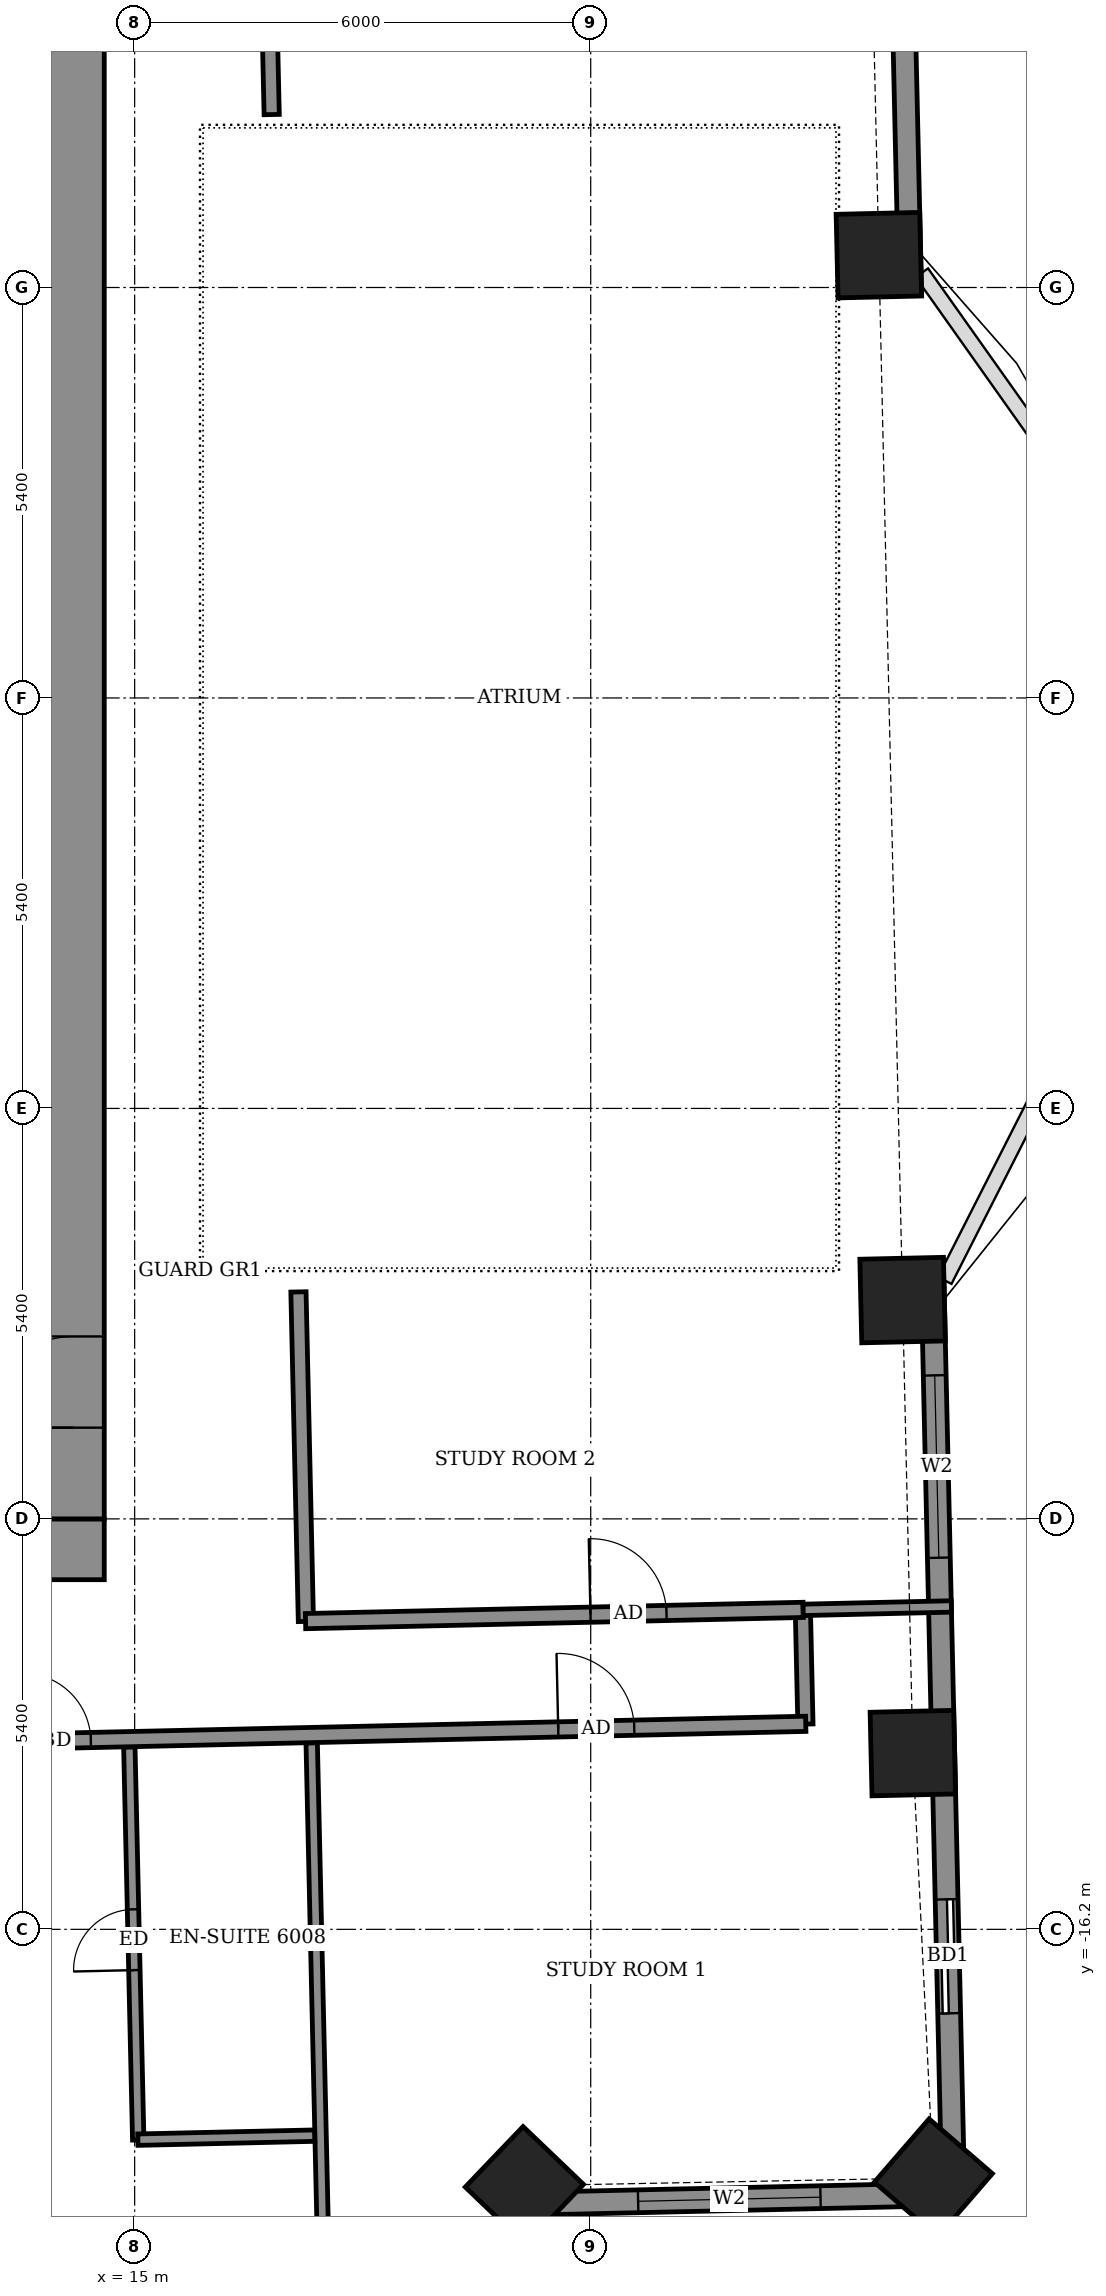
"""IFC4 building model, lengths in metres.
Left out: names, types, materials, properties, quantities, classifications, styles, units other than length and angle.
Written with IfcOpenShell. Run it as: python <this file> out.ifc"""

import sys

from ifc_helpers import new_model, si_unit, direction, frame, frame_2d, origin, origin_2d, place, context, subcontext, project, spatial, rectangle, extrude, element, fill, save


model = new_model("IFC4")
c1 = context("Model", 3, precision=1e-05, world=origin(), true_north=direction((0.0, 1.0)))
c2 = subcontext(c1, "Body", "Model", "MODEL_VIEW")
j1 = project(units=[si_unit("LENGTHUNIT", "METRE"), si_unit("PLANEANGLEUNIT", "RADIAN")], contexts=[c1])
p1 = place(None, origin())
s1 = spatial("IfcSite", under=j1, at=p1, CompositionType="ELEMENT")
p2 = place(p1, origin())
s2 = spatial("IfcBuilding", under=s1, at=p2, CompositionType="ELEMENT")
p3 = place(p2, frame((0.0, 0.0, 238.3)))
s3 = spatial("IfcBuildingStorey", under=s2, at=p3, CompositionType="ELEMENT", Elevation=238.3)
for number, where, z_axis, x_axis in (
    (1, (20.127, -19.573, -0.55), (0.0, 0.0, 1.0), (0.691, 0.723, 0.0)),
    (2, (25.508, -19.47, -0.55), (0.0, 0.0, 1.0), (0.654, 0.756, 0.0)),
    (3, (25.238, -13.882, -0.55), (0.0, 0.0, 1.0), (-0.023, 1.0, 0.0)),
    (4, (25.103, -7.921, -0.55), (0.0, 0.0, 1.0), (-0.023, 1.0, 0.0)),
    (5, (24.791, 5.825, -0.55), (0.0, 0.0, 1.0), (-0.023, 1.0, 0.0)),
):
    element("IfcColumn", number, at=place(p3, frame(where, z_axis=z_axis, x_axis=x_axis)), inside=s3, PredefinedType="COLUMN", context=c2, shape_type="SweptSolid", body=[
        extrude(rectangle(XDim=1.1, YDim=1.1, at=origin_2d()), origin(), (0.0, 0.0, 1.0), 3.6),
    ])
p4 = place(p3, frame((25.77, -19.684, 0.0), z_axis=(0.0, 0.0, 1.0), x_axis=(-0.022688489476, 0.999742583091, 0.0)))
e6 = element("IfcWall", 6, at=p4, inside=s3, PredefinedType="SOLIDWALL", context=c2, shape_type="SweptSolid", body=[
    extrude(rectangle(XDim=12.299, YDim=0.3, at=frame_2d((6.15, 0.0))), origin(), (0.0, 0.0, 1.0), 2.55),
])
p5 = place(p4, frame((2.38, 0.0, 0.0)))
e7 = element("IfcOpeningElement", 7, at=p5, cuts=e6, PredefinedType="OPENING", context=c2, shape_type="SweptSolid", body=[
    extrude(rectangle(XDim=1.5, YDim=2.4, at=frame_2d((0.75, 1.2))), frame((0.0, 0.16, 0.0), z_axis=(0.0, -1.0, 0.0), x_axis=(1.0, 0.0, 0.0)), (0.0, 0.0, 1.0), 0.32),
])
p6 = place(p4, frame((8.375, 0.0, 0.9)))
e8 = element("IfcOpeningElement", 8, at=p6, cuts=e6, PredefinedType="OPENING", context=c2, shape_type="SweptSolid", body=[
    extrude(rectangle(XDim=2.4, YDim=1.5, at=frame_2d((1.2, 0.75))), frame((0.0, 0.16, 0.0), z_axis=(0.0, -1.0, 0.0), x_axis=(1.0, 0.0, 0.0)), (0.0, 0.0, 1.0), 0.32),
])
p7 = place(p3, frame((25.203, 5.31, 0.0), z_axis=(0.0, 0.0, 1.0), x_axis=(-0.022708061432, 0.999742138727, 0.0)))
e9 = element("IfcWall", 9, at=p7, inside=s3, PredefinedType="SOLIDWALL", context=c2, shape_type="SweptSolid", body=[
    extrude(rectangle(XDim=13.299, YDim=0.3, at=frame_2d((6.65, 0.0))), origin(), (0.0, 0.0, 1.0), 2.55),
])
p8 = place(p7, frame((3.974, 0.0, 0.0)))
e10 = element("IfcOpeningElement", 10, at=p8, cuts=e9, PredefinedType="OPENING", context=c2, shape_type="SweptSolid", body=[
    extrude(rectangle(XDim=1.5, YDim=2.4, at=frame_2d((0.75, 1.2))), frame((0.0, 0.16, 0.0), z_axis=(0.0, -1.0, 0.0), x_axis=(1.0, 0.0, 0.0)), (0.0, 0.0, 1.0), 0.32),
])
p9 = place(p7, frame((8.1, 0.0, 0.9)))
e11 = element("IfcOpeningElement", 11, at=p9, cuts=e9, PredefinedType="OPENING", context=c2, shape_type="SweptSolid", body=[
    extrude(rectangle(XDim=0.9, YDim=1.5, at=frame_2d((0.45, 0.75))), frame((0.0, 0.16, 0.0), z_axis=(0.0, -1.0, 0.0), x_axis=(1.0, 0.0, 0.0)), (0.0, 0.0, 1.0), 0.32),
])
p10 = place(p7, frame((9.738, 0.0, 0.9)))
e12 = element("IfcOpeningElement", 12, at=p10, cuts=e9, PredefinedType="OPENING", context=c2, shape_type="SweptSolid", body=[
    extrude(rectangle(XDim=2.4, YDim=1.5, at=frame_2d((1.2, 0.75))), frame((0.0, 0.16, 0.0), z_axis=(0.0, -1.0, 0.0), x_axis=(1.0, 0.0, 0.0)), (0.0, 0.0, 1.0), 0.32),
])
p11 = place(p3, frame((20.494, -25.205, 0.0), z_axis=(0.0, 0.0, 1.0), x_axis=(-0.022558128916, 0.999745533033, 0.0)))
e13 = element("IfcWall", 13, at=p11, inside=s3, PredefinedType="SOLIDWALL", context=c2, shape_type="SweptSolid", body=[
    extrude(rectangle(XDim=5.401, YDim=0.3, at=frame_2d((2.7, 0.0))), origin(), (0.0, 0.0, 1.0), 2.55),
])
p12 = place(p11, frame((1.762, 0.0, 0.9)))
e14 = element("IfcOpeningElement", 14, at=p12, cuts=e13, PredefinedType="OPENING", context=c2, shape_type="SweptSolid", body=[
    extrude(rectangle(XDim=2.4, YDim=1.5, at=frame_2d((1.2, 0.75))), frame((0.0, 0.16, 0.0), z_axis=(0.0, -1.0, 0.0), x_axis=(1.0, 0.0, 0.0)), (0.0, 0.0, 1.0), 0.32),
])
p13 = place(p3, frame((20.372, -19.806, 0.0), z_axis=(0.0, 0.0, 1.0), x_axis=(0.999745417973, 0.02256322766, 0.0)))
e15 = element("IfcWall", 15, at=p13, inside=s3, PredefinedType="SOLIDWALL", context=c2, shape_type="SweptSolid", body=[
    extrude(rectangle(XDim=5.399, YDim=0.3, at=frame_2d((2.7, 0.0))), origin(), (0.0, 0.0, 1.0), 2.55),
])
p14 = place(p13, frame((1.252, 0.0, 0.9)))
e16 = element("IfcOpeningElement", 16, at=p14, cuts=e15, PredefinedType="OPENING", context=c2, shape_type="SweptSolid", body=[
    extrude(rectangle(XDim=2.4, YDim=1.5, at=frame_2d((1.2, 0.75))), frame((0.0, 0.16, 0.0), z_axis=(0.0, -1.0, 0.0), x_axis=(1.0, 0.0, 0.0)), (0.0, 0.0, 1.0), 0.32),
])
p15 = place(p3, frame((17.587, -25.121, 0.0), z_axis=(0.0, 0.0, 1.0), x_axis=(-0.022662905301, 0.999743163379, 0.0)))
e17 = element("IfcWall", 17, at=p15, inside=s3, PredefinedType="PARTITIONING", context=c2, shape_type="SweptSolid", body=[
    extrude(rectangle(XDim=11.376, YDim=0.15, at=frame_2d((5.688, 0.0))), origin(), (0.0, 0.0, 1.0), 2.55),
])
p16 = place(p3, frame((15.047, -18.971, 0.0), z_axis=(0.0, 0.0, 1.0), x_axis=(-0.022665628603, 0.999743101642, 0.0)))
e18 = element("IfcWall", 18, at=p16, inside=s3, PredefinedType="PARTITIONING", context=c2, shape_type="SweptSolid", body=[
    extrude(rectangle(XDim=5.17, YDim=0.15, at=frame_2d((2.585, 0.0))), origin(), (0.0, 0.0, 1.0), 3.05),
])
p17 = place(p16, frame((2.235, 0.0, 0.0)))
e19 = element("IfcOpeningElement", 19, at=p17, cuts=e18, PredefinedType="OPENING", context=c2, shape_type="SweptSolid", body=[
    extrude(rectangle(XDim=0.8, YDim=2.1, at=frame_2d((0.4, 1.05))), frame((0.0, 0.085, 0.0), z_axis=(0.0, -1.0, 0.0), x_axis=(1.0, 0.0, 0.0)), (0.0, 0.0, 1.0), 0.17),
])
p18 = place(p3, frame((15.043, -18.967, 0.0), z_axis=(0.0, 0.0, 1.0), x_axis=(0.999740478815, 0.022781023197, 0.0)))
e20 = element("IfcWall", 20, at=p18, inside=s3, PredefinedType="PARTITIONING", context=c2, shape_type="SweptSolid", body=[
    extrude(rectangle(XDim=2.325, YDim=0.15, at=frame_2d((1.163, 0.0))), origin(), (0.0, 0.0, 1.0), 3.05),
])
p19 = place(p3, frame((23.825, -13.5, 0.0), z_axis=(0.0, 0.0, 1.0), x_axis=(-0.022632637625, 0.99974384905, 0.0)))
e21 = element("IfcWall", 21, at=p19, inside=s3, PredefinedType="PARTITIONING", context=c2, shape_type="SweptSolid", body=[
    extrude(rectangle(XDim=1.5, YDim=0.2, at=frame_2d((0.75, 0.0))), origin(), (0.0, 0.0, 1.0), 3.05),
])
p20 = place(p3, frame((-27.016, -14.65, 0.0), z_axis=(0.0, 0.0, 1.0), x_axis=(0.999742623033, 0.022686729391, 0.0)))
e22 = element("IfcWall", 22, at=p20, inside=s3, PredefinedType="PARTITIONING", context=c2, shape_type="SweptSolid", body=[
    extrude(rectangle(XDim=50.858, YDim=0.2, at=frame_2d((25.429, 0.0))), origin(), (0.0, 0.0, 1.0), 3.05),
])
p21 = place(p20, frame((1.625, 0.0, 0.0)))
e23 = element("IfcOpeningElement", 23, at=p21, cuts=e22, PredefinedType="OPENING", context=c2, shape_type="SweptSolid", body=[
    extrude(rectangle(XDim=1.0, YDim=2.1, at=frame_2d((0.5, 1.05))), frame((0.0, 0.11, 0.0), z_axis=(0.0, -1.0, 0.0), x_axis=(1.0, 0.0, 0.0)), (0.0, 0.0, 1.0), 0.22),
])
p22 = place(p20, frame((6.6, 0.0, 0.0)))
e24 = element("IfcOpeningElement", 24, at=p22, cuts=e22, PredefinedType="OPENING", context=c2, shape_type="SweptSolid", body=[
    extrude(rectangle(XDim=0.9, YDim=2.1, at=frame_2d((0.45, 1.05))), frame((0.0, 0.11, 0.0), z_axis=(0.0, -1.0, 0.0), x_axis=(1.0, 0.0, 0.0)), (0.0, 0.0, 1.0), 0.22),
])
p23 = place(p20, frame((11.5, 0.0, 0.0)))
e25 = element("IfcOpeningElement", 25, at=p23, cuts=e22, PredefinedType="OPENING", context=c2, shape_type="SweptSolid", body=[
    extrude(rectangle(XDim=0.9, YDim=2.1, at=frame_2d((0.45, 1.05))), frame((0.0, 0.11, 0.0), z_axis=(0.0, -1.0, 0.0), x_axis=(1.0, 0.0, 0.0)), (0.0, 0.0, 1.0), 0.22),
])
p24 = place(p20, frame((13.675, 0.0, 0.0)))
e26 = element("IfcOpeningElement", 26, at=p24, cuts=e22, PredefinedType="OPENING", context=c2, shape_type="SweptSolid", body=[
    extrude(rectangle(XDim=0.9, YDim=2.1, at=frame_2d((0.45, 1.05))), frame((0.0, 0.11, 0.0), z_axis=(0.0, -1.0, 0.0), x_axis=(1.0, 0.0, 0.0)), (0.0, 0.0, 1.0), 0.22),
])
p25 = place(p20, frame((20.625, 0.0, 0.0)))
e27 = element("IfcOpeningElement", 27, at=p25, cuts=e22, PredefinedType="OPENING", context=c2, shape_type="SweptSolid", body=[
    extrude(rectangle(XDim=0.9, YDim=2.1, at=frame_2d((0.45, 1.05))), frame((0.0, 0.11, 0.0), z_axis=(0.0, -1.0, 0.0), x_axis=(1.0, 0.0, 0.0)), (0.0, 0.0, 1.0), 0.22),
])
p26 = place(p20, frame((22.775, 0.0, 0.0)))
e28 = element("IfcOpeningElement", 28, at=p26, cuts=e22, PredefinedType="OPENING", context=c2, shape_type="SweptSolid", body=[
    extrude(rectangle(XDim=0.9, YDim=2.1, at=frame_2d((0.45, 1.05))), frame((0.0, 0.11, 0.0), z_axis=(0.0, -1.0, 0.0), x_axis=(1.0, 0.0, 0.0)), (0.0, 0.0, 1.0), 0.22),
])
p27 = place(p20, frame((29.65, 0.0, 0.0)))
e29 = element("IfcOpeningElement", 29, at=p27, cuts=e22, PredefinedType="OPENING", context=c2, shape_type="SweptSolid", body=[
    extrude(rectangle(XDim=0.9, YDim=2.1, at=frame_2d((0.45, 1.05))), frame((0.0, 0.11, 0.0), z_axis=(0.0, -1.0, 0.0), x_axis=(1.0, 0.0, 0.0)), (0.0, 0.0, 1.0), 0.22),
])
p28 = place(p20, frame((31.625, 0.0, 0.0)))
e30 = element("IfcOpeningElement", 30, at=p28, cuts=e22, PredefinedType="OPENING", context=c2, shape_type="SweptSolid", body=[
    extrude(rectangle(XDim=0.9, YDim=2.1, at=frame_2d((0.45, 1.05))), frame((0.0, 0.11, 0.0), z_axis=(0.0, -1.0, 0.0), x_axis=(1.0, 0.0, 0.0)), (0.0, 0.0, 1.0), 0.22),
])
p29 = place(p20, frame((38.5, 0.0, 0.0)))
e31 = element("IfcOpeningElement", 31, at=p29, cuts=e22, PredefinedType="OPENING", context=c2, shape_type="SweptSolid", body=[
    extrude(rectangle(XDim=0.9, YDim=2.1, at=frame_2d((0.45, 1.05))), frame((0.0, 0.11, 0.0), z_axis=(0.0, -1.0, 0.0), x_axis=(1.0, 0.0, 0.0)), (0.0, 0.0, 1.0), 0.22),
])
p30 = place(p20, frame((40.55, 0.0, 0.0)))
e32 = element("IfcOpeningElement", 32, at=p30, cuts=e22, PredefinedType="OPENING", context=c2, shape_type="SweptSolid", body=[
    extrude(rectangle(XDim=0.9, YDim=2.1, at=frame_2d((0.45, 1.05))), frame((0.0, 0.11, 0.0), z_axis=(0.0, -1.0, 0.0), x_axis=(1.0, 0.0, 0.0)), (0.0, 0.0, 1.0), 0.22),
])
p31 = place(p20, frame((47.601, 0.0, 0.0)))
e33 = element("IfcOpeningElement", 33, at=p31, cuts=e22, PredefinedType="OPENING", context=c2, shape_type="SweptSolid", body=[
    extrude(rectangle(XDim=1.0, YDim=2.1, at=frame_2d((0.5, 1.05))), frame((0.0, 0.11, 0.0), z_axis=(0.0, -1.0, 0.0), x_axis=(1.0, 0.0, 0.0)), (0.0, 0.0, 1.0), 0.22),
])
p32 = place(p3, frame((17.253, -12.149, 0.0), z_axis=(0.0, 0.0, 1.0), x_axis=(-0.022578158225, 0.999745080894, 0.0)))
e34 = element("IfcWall", 34, at=p32, inside=s3, PredefinedType="PARTITIONING", context=c2, shape_type="SweptSolid", body=[
    extrude(rectangle(XDim=4.336, YDim=0.2, at=frame_2d((2.168, 0.0))), origin(), (0.0, 0.0, 1.0), 3.05),
])
p33 = place(p3, frame((17.248, -12.145, 0.0), z_axis=(0.0, 0.0, 1.0), x_axis=(0.999744752818, 0.022592680497, 0.0)))
e35 = element("IfcWall", 35, at=p33, inside=s3, PredefinedType="PARTITIONING", context=c2, shape_type="SweptSolid", body=[
    extrude(rectangle(XDim=6.549, YDim=0.2, at=frame_2d((3.274, 0.0))), origin(), (0.0, 0.0, 1.0), 3.05),
])
p34 = place(p33, frame((3.75, 0.0, 0.0)))
e36 = element("IfcOpeningElement", 36, at=p34, cuts=e35, PredefinedType="OPENING", context=c2, shape_type="SweptSolid", body=[
    extrude(rectangle(XDim=1.0, YDim=2.1, at=frame_2d((0.5, 1.05))), frame((0.0, 0.11, 0.0), z_axis=(0.0, -1.0, 0.0), x_axis=(1.0, 0.0, 0.0)), (0.0, 0.0, 1.0), 0.22),
])
p35 = place(p3, frame((23.795, -11.997, 0.0), z_axis=(0.0, 0.0, 1.0), x_axis=(0.999731921069, 0.023153530971, 0.0)))
e37 = element("IfcWall", 37, at=p35, inside=s3, PredefinedType="PARTITIONING", context=c2, shape_type="SweptSolid", body=[
    extrude(rectangle(XDim=1.951, YDim=0.15, at=frame_2d((0.975, 0.0))), origin(), (0.0, 0.0, 1.0), 2.55),
])
p36 = place(p3, frame((16.803, 7.675, 0.0), z_axis=(0.0, 0.0, 1.0), x_axis=(-0.022667483124, 0.999743059595, 0.0)))
e38 = element("IfcWall", 38, at=p36, inside=s3, PredefinedType="PARTITIONING", context=c2, shape_type="SweptSolid", body=[
    extrude(rectangle(XDim=5.245, YDim=0.2, at=frame_2d((2.623, 0.0))), origin(), (0.0, 0.0, 1.0), 3.05),
])
p37 = place(p3, frame((-14.6, -11.2, 0.0), z_axis=(0.0, 0.0, 1.0), x_axis=(1.0, 0.0, 0.0)))
e39 = element("IfcWall", 39, at=p37, inside=s3, PredefinedType="SHEAR", context=c2, shape_type="SweptSolid", body=[
    extrude(rectangle(XDim=29.2, YDim=0.8, at=frame_2d((14.6, 0.0))), origin(), (0.0, 0.0, 1.0), 3.6),
])
p38 = place(p3, frame((14.2, -10.8, 0.0), z_axis=(0.0, 0.0, 1.0), x_axis=(0.0, 1.0, 0.0)))
e40 = element("IfcWall", 40, at=p38, inside=s3, PredefinedType="SHEAR", context=c2, shape_type="SweptSolid", body=[
    extrude(rectangle(XDim=21.6, YDim=0.8, at=frame_2d((10.8, 0.0))), origin(), (0.0, 0.0, 1.0), 3.6),
])
p39 = place(p38, frame((1.2, 0.0, 0.0)))
e41 = element("IfcOpeningElement", 41, at=p39, cuts=e40, PredefinedType="OPENING", context=c2, shape_type="SweptSolid", body=[
    extrude(rectangle(XDim=1.2, YDim=2.1, at=frame_2d((0.6, 1.05))), frame((0.0, 0.41, 0.0), z_axis=(0.0, -1.0, 0.0), x_axis=(1.0, 0.0, 0.0)), (0.0, 0.0, 1.0), 0.82),
])
p40 = place(p5, origin())
e42 = element("IfcDoor", 42, at=p40, inside=s3, OperationType="SLIDING_TO_LEFT", PredefinedType="DOOR", context=c2, shape_type="SweptSolid", body=[
    extrude(rectangle(XDim=1.5, YDim=2.4, at=frame_2d((0.75, 1.2))), frame((0.0, 0.025, 0.0), z_axis=(0.0, -1.0, 0.0), x_axis=(1.0, 0.0, 0.0)), (0.0, 0.0, 1.0), 0.05),
])
fill(e7, e42)
p41 = place(p6, origin())
e43 = element("IfcWindow", 43, at=p41, inside=s3, PartitioningType="DOUBLE_PANEL_VERTICAL", PredefinedType="WINDOW", context=c2, shape_type="SweptSolid", body=[
    extrude(rectangle(XDim=2.4, YDim=1.5, at=frame_2d((1.2, 0.75))), frame((0.0, 0.03, 0.0), z_axis=(0.0, -1.0, 0.0), x_axis=(1.0, 0.0, 0.0)), (0.0, 0.0, 1.0), 0.06),
])
fill(e8, e43)
p42 = place(p14, origin())
e44 = element("IfcWindow", 44, at=p42, inside=s3, PartitioningType="DOUBLE_PANEL_VERTICAL", PredefinedType="WINDOW", context=c2, shape_type="SweptSolid", body=[
    extrude(rectangle(XDim=2.4, YDim=1.5, at=frame_2d((1.2, 0.75))), frame((0.0, 0.03, 0.0), z_axis=(0.0, -1.0, 0.0), x_axis=(1.0, 0.0, 0.0)), (0.0, 0.0, 1.0), 0.06),
])
fill(e16, e44)
p43 = place(p30, origin())
e45 = element("IfcDoor", 45, at=p43, inside=s3, OperationType="SINGLE_SWING_RIGHT", PredefinedType="DOOR", context=c2, shape_type="SweptSolid", body=[
    extrude(rectangle(XDim=0.9, YDim=2.1, at=frame_2d((0.45, 1.05))), frame((0.0, 0.025, 0.0), z_axis=(0.0, -1.0, 0.0), x_axis=(1.0, 0.0, 0.0)), (0.0, 0.0, 1.0), 0.05),
])
fill(e32, e45)
p44 = place(p17, origin())
e46 = element("IfcDoor", 46, at=p44, inside=s3, OperationType="SINGLE_SWING_RIGHT", PredefinedType="DOOR", context=c2, shape_type="SweptSolid", body=[
    extrude(rectangle(XDim=0.8, YDim=2.1, at=frame_2d((0.4, 1.05))), frame((0.0, 0.025, 0.0), z_axis=(0.0, -1.0, 0.0), x_axis=(1.0, 0.0, 0.0)), (0.0, 0.0, 1.0), 0.05),
])
fill(e19, e46)
p45 = place(p31, origin())
e47 = element("IfcDoor", 47, at=p45, inside=s3, OperationType="SINGLE_SWING_RIGHT", PredefinedType="DOOR", context=c2, shape_type="SweptSolid", body=[
    extrude(rectangle(XDim=1.0, YDim=2.1, at=frame_2d((0.5, 1.05))), frame((0.0, 0.025, 0.0), z_axis=(0.0, -1.0, 0.0), x_axis=(1.0, 0.0, 0.0)), (0.0, 0.0, 1.0), 0.05),
])
fill(e33, e47)
p46 = place(p34, origin())
e48 = element("IfcDoor", 48, at=p46, inside=s3, OperationType="SINGLE_SWING_LEFT", PredefinedType="DOOR", context=c2, shape_type="SweptSolid", body=[
    extrude(rectangle(XDim=1.0, YDim=2.1, at=frame_2d((0.5, 1.05))), frame((0.0, 0.025, 0.0), z_axis=(0.0, -1.0, 0.0), x_axis=(1.0, 0.0, 0.0)), (0.0, 0.0, 1.0), 0.05),
])
fill(e36, e48)
p47 = place(p39, origin())
e49 = element("IfcDoor", 49, at=p47, inside=s3, OperationType="DOUBLE_DOOR_SINGLE_SWING", PredefinedType="DOOR", context=c2, shape_type="SweptSolid", body=[
    extrude(rectangle(XDim=1.2, YDim=2.1, at=frame_2d((0.6, 1.05))), frame((0.0, 0.025, 0.0), z_axis=(0.0, -1.0, 0.0), x_axis=(1.0, 0.0, 0.0)), (0.0, 0.0, 1.0), 0.05),
])
fill(e41, e49)
save(model, sys.argv[1])
